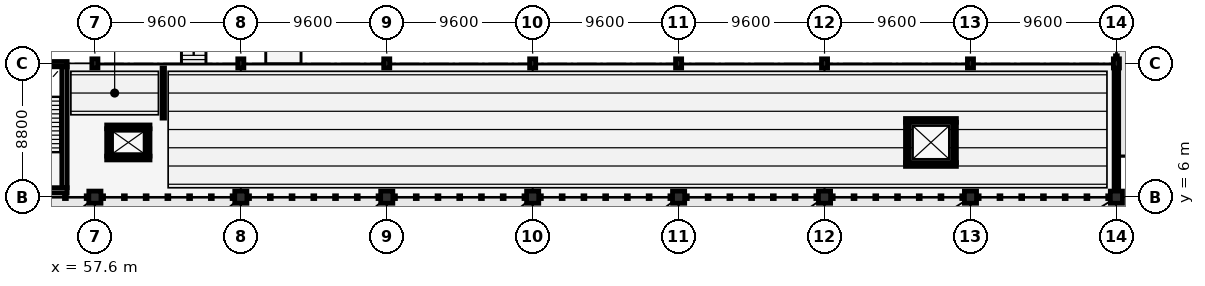
"""IFC4 building model, lengths in metres.
Left out: names, types, materials, properties, quantities, classifications, styles, units other than length and angle.
Written with IfcOpenShell. Run it as: python <this file> out.ifc"""

import sys

from ifc_helpers import new_model, si_unit, direction, frame, frame_2d, origin, origin_2d, place, context, subcontext, project, spatial, rectangle, extrude, element, fill, save


model = new_model("IFC4")
c1 = context("Model", 3, precision=1e-05, world=origin(), true_north=direction((0.0, 1.0)))
c2 = subcontext(c1, "Body", "Model", "MODEL_VIEW")
j1 = project(units=[si_unit("LENGTHUNIT", "METRE"), si_unit("PLANEANGLEUNIT", "RADIAN")], contexts=[c1])
p1 = place(None, origin())
s1 = spatial("IfcSite", under=j1, at=p1, CompositionType="ELEMENT")
p2 = place(p1, origin())
s2 = spatial("IfcBuilding", under=s1, at=p2, CompositionType="ELEMENT")
p3 = place(p2, frame((0.0, 0.0, 4.8)))
s3 = spatial("IfcBuildingStorey", under=s2, at=p3, CompositionType="ELEMENT", Elevation=4.8)
p4 = place(p3, frame((57.6, 6.0, 0.0), z_axis=(0.0, 0.0, 1.0), x_axis=(1.0, 0.0, 0.0)))
e1 = element("IfcColumn", 1, at=p4, inside=s3, PredefinedType="COLUMN", context=c2, shape_type="SweptSolid", body=[
    extrude(rectangle(XDim=0.8, YDim=0.8, at=origin_2d()), origin(), (0.0, 0.0, 1.0), 4.8),
])
p5 = place(p3, frame((57.6, 14.8, 0.0), z_axis=(0.0, 0.0, 1.0), x_axis=(1.0, 0.0, 0.0)))
e2 = element("IfcColumn", 2, at=p5, inside=s3, PredefinedType="COLUMN", context=c2, shape_type="SweptSolid", body=[
    extrude(rectangle(XDim=0.4, YDim=0.6, at=origin_2d()), origin(), (0.0, 0.0, 1.0), 4.8),
])
p6 = place(p3, frame((67.2, 6.0, 0.0), z_axis=(0.0, 0.0, 1.0), x_axis=(1.0, 0.0, 0.0)))
e3 = element("IfcColumn", 3, at=p6, inside=s3, PredefinedType="COLUMN", context=c2, shape_type="SweptSolid", body=[
    extrude(rectangle(XDim=0.8, YDim=0.8, at=origin_2d()), origin(), (0.0, 0.0, 1.0), 4.8),
])
p7 = place(p3, frame((67.2, 14.8, 0.0), z_axis=(0.0, 0.0, 1.0), x_axis=(1.0, 0.0, 0.0)))
e4 = element("IfcColumn", 4, at=p7, inside=s3, PredefinedType="COLUMN", context=c2, shape_type="SweptSolid", body=[
    extrude(rectangle(XDim=0.4, YDim=0.6, at=origin_2d()), origin(), (0.0, 0.0, 1.0), 4.8),
])
p8 = place(p3, frame((76.8, 6.0, 0.0), z_axis=(0.0, 0.0, 1.0), x_axis=(1.0, 0.0, 0.0)))
e5 = element("IfcColumn", 5, at=p8, inside=s3, PredefinedType="COLUMN", context=c2, shape_type="SweptSolid", body=[
    extrude(rectangle(XDim=0.8, YDim=0.8, at=origin_2d()), origin(), (0.0, 0.0, 1.0), 4.8),
])
p9 = place(p3, frame((76.8, 14.8, 0.0), z_axis=(0.0, 0.0, 1.0), x_axis=(1.0, 0.0, 0.0)))
e6 = element("IfcColumn", 6, at=p9, inside=s3, PredefinedType="COLUMN", context=c2, shape_type="SweptSolid", body=[
    extrude(rectangle(XDim=0.4, YDim=0.6, at=origin_2d()), origin(), (0.0, 0.0, 1.0), 4.8),
])
p10 = place(p3, frame((86.4, 6.0, 0.0), z_axis=(0.0, 0.0, 1.0), x_axis=(1.0, 0.0, 0.0)))
e7 = element("IfcColumn", 7, at=p10, inside=s3, PredefinedType="COLUMN", context=c2, shape_type="SweptSolid", body=[
    extrude(rectangle(XDim=0.8, YDim=0.8, at=origin_2d()), origin(), (0.0, 0.0, 1.0), 4.8),
])
p11 = place(p3, frame((86.4, 14.8, 0.0), z_axis=(0.0, 0.0, 1.0), x_axis=(1.0, 0.0, 0.0)))
e8 = element("IfcColumn", 8, at=p11, inside=s3, PredefinedType="COLUMN", context=c2, shape_type="SweptSolid", body=[
    extrude(rectangle(XDim=0.4, YDim=0.6, at=origin_2d()), origin(), (0.0, 0.0, 1.0), 4.8),
])
p12 = place(p3, frame((96.0, 6.0, 0.0), z_axis=(0.0, 0.0, 1.0), x_axis=(1.0, 0.0, 0.0)))
e9 = element("IfcColumn", 9, at=p12, inside=s3, PredefinedType="COLUMN", context=c2, shape_type="SweptSolid", body=[
    extrude(rectangle(XDim=0.8, YDim=0.8, at=origin_2d()), origin(), (0.0, 0.0, 1.0), 4.8),
])
p13 = place(p3, frame((96.0, 14.8, 0.0), z_axis=(0.0, 0.0, 1.0), x_axis=(1.0, 0.0, 0.0)))
e10 = element("IfcColumn", 10, at=p13, inside=s3, PredefinedType="COLUMN", context=c2, shape_type="SweptSolid", body=[
    extrude(rectangle(XDim=0.4, YDim=0.6, at=origin_2d()), origin(), (0.0, 0.0, 1.0), 4.8),
])
p14 = place(p3, frame((105.6, 6.0, 0.0), z_axis=(0.0, 0.0, 1.0), x_axis=(1.0, 0.0, 0.0)))
e11 = element("IfcColumn", 11, at=p14, inside=s3, PredefinedType="COLUMN", context=c2, shape_type="SweptSolid", body=[
    extrude(rectangle(XDim=0.8, YDim=0.8, at=origin_2d()), origin(), (0.0, 0.0, 1.0), 4.8),
])
p15 = place(p3, frame((105.6, 14.8, 0.0), z_axis=(0.0, 0.0, 1.0), x_axis=(1.0, 0.0, 0.0)))
e12 = element("IfcColumn", 12, at=p15, inside=s3, PredefinedType="COLUMN", context=c2, shape_type="SweptSolid", body=[
    extrude(rectangle(XDim=0.4, YDim=0.6, at=origin_2d()), origin(), (0.0, 0.0, 1.0), 4.8),
])
p16 = place(p3, frame((115.2, 6.0, 0.0), z_axis=(0.0, 0.0, 1.0), x_axis=(1.0, 0.0, 0.0)))
e13 = element("IfcColumn", 13, at=p16, inside=s3, PredefinedType="COLUMN", context=c2, shape_type="SweptSolid", body=[
    extrude(rectangle(XDim=0.8, YDim=0.8, at=origin_2d()), origin(), (0.0, 0.0, 1.0), 4.8),
])
p17 = place(p3, frame((115.2, 14.8, 0.0), z_axis=(0.0, 0.0, 1.0), x_axis=(1.0, 0.0, 0.0)))
e14 = element("IfcColumn", 14, at=p17, inside=s3, PredefinedType="COLUMN", context=c2, shape_type="SweptSolid", body=[
    extrude(rectangle(XDim=0.4, YDim=0.6, at=origin_2d()), origin(), (0.0, 0.0, 1.0), 4.8),
])
p18 = place(p3, frame((124.8, 6.0, 0.0), z_axis=(0.0, 0.0, 1.0), x_axis=(1.0, 0.0, 0.0)))
e15 = element("IfcColumn", 15, at=p18, inside=s3, PredefinedType="COLUMN", context=c2, shape_type="SweptSolid", body=[
    extrude(rectangle(XDim=0.8, YDim=0.8, at=origin_2d()), origin(), (0.0, 0.0, 1.0), 4.8),
])
p19 = place(p3, frame((124.8, 14.8, 0.0), z_axis=(0.0, 0.0, 1.0), x_axis=(1.0, 0.0, 0.0)))
e16 = element("IfcColumn", 16, at=p19, inside=s3, PredefinedType="COLUMN", context=c2, shape_type="SweptSolid", body=[
    extrude(rectangle(XDim=0.4, YDim=0.6, at=origin_2d()), origin(), (0.0, 0.0, 1.0), 4.8),
])
p20 = place(p3, frame((124.8, 6.4, 0.0), z_axis=(0.0, 0.0, 1.0), x_axis=(0.0, 1.0, 0.0)))
e17 = element("IfcWall", 17, at=p20, inside=s3, PredefinedType="STANDARD", context=c2, shape_type="SweptSolid", body=[
    extrude(rectangle(XDim=8.1, YDim=0.3, at=frame_2d((4.05, 0.0))), origin(), (0.0, 0.0, 1.0), 4.2),
])
p21 = place(p20, frame((3.2, 0.0, 0.0)))
e18 = element("IfcOpeningElement", 18, at=p21, cuts=e17, PredefinedType="OPENING", context=c2, shape_type="SweptSolid", body=[
    extrude(rectangle(XDim=1.68, YDim=2.31, at=frame_2d((0.84, 1.155))), frame((0.0, 0.16, 0.0), z_axis=(0.0, -1.0, 0.0), x_axis=(1.0, 0.0, 0.0)), (0.0, 0.0, 1.0), 0.32),
])
for number, where, z_axis, x_axis in (
    (19, (55.775, 6.45, 0.0), (0.0, 0.0, 1.0), (-1.0, 0.0, 0.0)),
    (20, (50.125, 14.75, 0.0), (0.0, 0.0, 1.0), (1.0, 0.0, 0.0)),
):
    element("IfcWall", number, at=place(p3, frame(where, z_axis=z_axis, x_axis=x_axis)), inside=s3, PredefinedType="SHEAR", context=c2, shape_type="SweptSolid", body=[
        extrude(rectangle(XDim=5.65, YDim=0.35, at=frame_2d((2.825, 0.0))), origin(), (0.0, 0.0, 1.0), 4.55),
    ])
p22 = place(p3, frame((55.6, 14.575, 0.0), z_axis=(0.0, 0.0, 1.0), x_axis=(0.0, -1.0, 0.0)))
e21 = element("IfcWall", 21, at=p22, inside=s3, PredefinedType="SHEAR", context=c2, shape_type="SweptSolid", body=[
    extrude(rectangle(XDim=7.95, YDim=0.35, at=frame_2d((3.975, 0.0))), origin(), (0.0, 0.0, 1.0), 4.55),
])
p23 = place(p22, frame((5.68, 0.0, 0.0)))
e22 = element("IfcOpeningElement", 22, at=p23, cuts=e21, PredefinedType="OPENING", context=c2, shape_type="SweptSolid", body=[
    extrude(rectangle(XDim=2.05, YDim=2.15, at=frame_2d((1.025, 1.075))), frame((0.0, 0.185, 0.0), z_axis=(0.0, -1.0, 0.0), x_axis=(1.0, 0.0, 0.0)), (0.0, 0.0, 1.0), 0.37),
])
p24 = place(p3, frame((61.225, 8.575, 0.0), z_axis=(0.0, 0.0, 1.0), x_axis=(-1.0, 0.0, 0.0)))
e23 = element("IfcWall", 23, at=p24, inside=s3, PredefinedType="SOLIDWALL", context=c2, shape_type="SweptSolid", body=[
    extrude(rectangle(XDim=2.85, YDim=0.25, at=frame_2d((1.425, 0.0))), origin(), (0.0, 0.0, 1.0), 4.55),
])
p25 = place(p3, frame((58.375, 10.625, 0.0), z_axis=(0.0, 0.0, 1.0), x_axis=(1.0, 0.0, 0.0)))
e24 = element("IfcWall", 24, at=p25, inside=s3, PredefinedType="SOLIDWALL", context=c2, shape_type="SweptSolid", body=[
    extrude(rectangle(XDim=2.85, YDim=0.25, at=frame_2d((1.425, 0.0))), origin(), (0.0, 0.0, 1.0), 4.55),
])
p26 = place(p25, frame((0.875, 0.0, 0.0)))
e25 = element("IfcOpeningElement", 25, at=p26, cuts=e24, PredefinedType="OPENING", context=c2, shape_type="SweptSolid", body=[
    extrude(rectangle(XDim=1.1, YDim=2.15, at=frame_2d((0.55, 1.075))), frame((0.0, 0.135, 0.0), z_axis=(0.0, -1.0, 0.0), x_axis=(1.0, 0.0, 0.0)), (0.0, 0.0, 1.0), 0.27),
])
for number, where, z_axis, x_axis in (
    (26, (58.5, 8.7, 0.0), (0.0, 0.0, 1.0), (0.0, 1.0, 0.0)),
    (27, (61.1, 10.5, 0.0), (0.0, 0.0, 1.0), (0.0, -1.0, 0.0)),
):
    element("IfcWall", number, at=place(p3, frame(where, z_axis=z_axis, x_axis=x_axis)), inside=s3, PredefinedType="SOLIDWALL", context=c2, shape_type="SweptSolid", body=[
        extrude(rectangle(XDim=1.8, YDim=0.25, at=frame_2d((0.9, 0.0))), origin(), (0.0, 0.0, 1.0), 4.55),
    ])
p27 = place(p3, frame((114.275, 8.15, 0.0), z_axis=(0.0, 0.0, 1.0), x_axis=(-1.0, 0.0, 0.0)))
e28 = element("IfcWall", 28, at=p27, inside=s3, PredefinedType="SOLIDWALL", context=c2, shape_type="SweptSolid", body=[
    extrude(rectangle(XDim=3.35, YDim=0.25, at=frame_2d((1.675, 0.0))), origin(), (0.0, 0.0, 1.0), 4.8),
])
p28 = place(p3, frame((110.925, 11.05, 0.0), z_axis=(0.0, 0.0, 1.0), x_axis=(1.0, 0.0, 0.0)))
e29 = element("IfcWall", 29, at=p28, inside=s3, PredefinedType="SOLIDWALL", context=c2, shape_type="SweptSolid", body=[
    extrude(rectangle(XDim=3.35, YDim=0.25, at=frame_2d((1.675, 0.0))), origin(), (0.0, 0.0, 1.0), 4.8),
])
p29 = place(p28, frame((0.775, 0.0, 0.0)))
e30 = element("IfcOpeningElement", 30, at=p29, cuts=e29, PredefinedType="OPENING", context=c2, shape_type="SweptSolid", body=[
    extrude(rectangle(XDim=1.8, YDim=2.3, at=frame_2d((0.9, 1.15))), frame((0.0, 0.135, 0.0), z_axis=(0.0, -1.0, 0.0), x_axis=(1.0, 0.0, 0.0)), (0.0, 0.0, 1.0), 0.27),
])
for number, where, z_axis, x_axis in (
    (31, (111.05, 8.275, 0.0), (0.0, 0.0, 1.0), (0.0, 1.0, 0.0)),
    (32, (114.15, 10.925, 0.0), (0.0, 0.0, 1.0), (0.0, -1.0, 0.0)),
):
    element("IfcWall", number, at=place(p3, frame(where, z_axis=z_axis, x_axis=x_axis)), inside=s3, PredefinedType="SOLIDWALL", context=c2, shape_type="SweptSolid", body=[
        extrude(rectangle(XDim=2.65, YDim=0.25, at=frame_2d((1.325, 0.0))), origin(), (0.0, 0.0, 1.0), 4.8),
    ])
p30 = place(p3, frame((62.1, 11.2, 0.0), z_axis=(0.0, 0.0, 1.0), x_axis=(0.0, 1.0, 0.0)))
e33 = element("IfcWall", 33, at=p30, inside=s3, PredefinedType="PARTITIONING", context=c2, shape_type="SweptSolid", body=[
    extrude(rectangle(XDim=3.3, YDim=0.16, at=frame_2d((1.65, 0.0))), origin(), (0.0, 0.0, 1.0), 4.42),
])
p31 = place(p30, frame((0.75, 0.0, 0.0)))
e34 = element("IfcOpeningElement", 34, at=p31, cuts=e33, PredefinedType="OPENING", context=c2, shape_type="SweptSolid", body=[
    extrude(rectangle(XDim=1.8, YDim=2.15, at=frame_2d((0.9, 1.075))), frame((0.0, 0.09, 0.0), z_axis=(0.0, -1.0, 0.0), x_axis=(1.0, 0.0, 0.0)), (0.0, 0.0, 1.0), 0.18),
])
p32 = place(p21, origin())
e35 = element("IfcDoor", 35, at=p32, inside=s3, OperationType="DOUBLE_DOOR_SINGLE_SWING", PredefinedType="DOOR", context=c2, shape_type="SweptSolid", body=[
    extrude(rectangle(XDim=1.68, YDim=2.31, at=frame_2d((0.84, 1.155))), frame((0.0, 0.025, 0.0), z_axis=(0.0, -1.0, 0.0), x_axis=(1.0, 0.0, 0.0)), (0.0, 0.0, 1.0), 0.05),
])
fill(e18, e35)
p33 = place(p23, origin())
e36 = element("IfcDoor", 36, at=p33, inside=s3, OperationType="DOUBLE_DOOR_SINGLE_SWING", PredefinedType="DOOR", context=c2, shape_type="SweptSolid", body=[
    extrude(rectangle(XDim=2.05, YDim=2.15, at=frame_2d((1.025, 1.075))), frame((0.0, 0.025, 0.0), z_axis=(0.0, -1.0, 0.0), x_axis=(1.0, 0.0, 0.0)), (0.0, 0.0, 1.0), 0.05),
])
fill(e22, e36)
p34 = place(p26, origin())
e37 = element("IfcDoor", 37, at=p34, inside=s3, OperationType="DOUBLE_DOOR_SLIDING", PredefinedType="DOOR", context=c2, shape_type="SweptSolid", body=[
    extrude(rectangle(XDim=1.1, YDim=2.15, at=frame_2d((0.55, 1.075))), frame((0.0, 0.025, 0.0), z_axis=(0.0, -1.0, 0.0), x_axis=(1.0, 0.0, 0.0)), (0.0, 0.0, 1.0), 0.05),
])
fill(e25, e37)
p35 = place(p29, origin())
e38 = element("IfcDoor", 38, at=p35, inside=s3, OperationType="DOUBLE_DOOR_SLIDING", PredefinedType="DOOR", context=c2, shape_type="SweptSolid", body=[
    extrude(rectangle(XDim=1.8, YDim=2.3, at=frame_2d((0.9, 1.15))), frame((0.0, 0.025, 0.0), z_axis=(0.0, -1.0, 0.0), x_axis=(1.0, 0.0, 0.0)), (0.0, 0.0, 1.0), 0.05),
])
fill(e30, e38)
p36 = place(p31, origin())
e39 = element("IfcDoor", 39, at=p36, inside=s3, OperationType="DOUBLE_DOOR_SINGLE_SWING", PredefinedType="DOOR", context=c2, shape_type="SweptSolid", body=[
    extrude(rectangle(XDim=1.8, YDim=2.15, at=frame_2d((0.9, 1.075))), frame((0.0, 0.025, 0.0), z_axis=(0.0, -1.0, 0.0), x_axis=(1.0, 0.0, 0.0)), (0.0, 0.0, 1.0), 0.05),
])
fill(e34, e39)
save(model, sys.argv[1])
